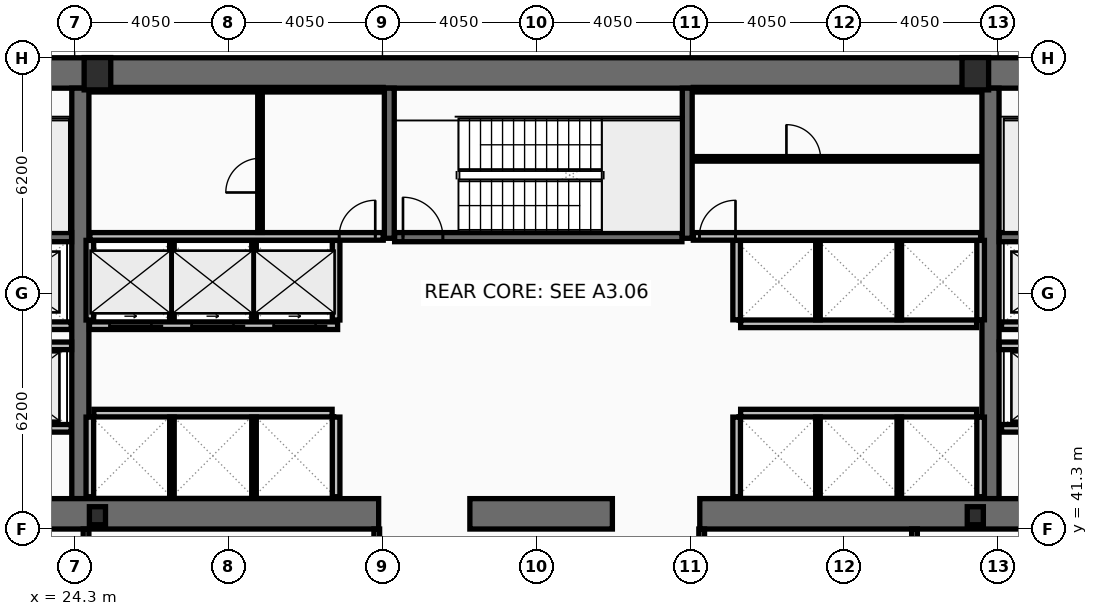
"""IFC4 building model, lengths in metres.
Left out: names, types, materials, properties, quantities, classifications, styles, units other than length and angle.
Written with IfcOpenShell. Run it as: python <this file> out.ifc"""

import sys

from ifc_helpers import new_model, si_unit, direction, frame, frame_2d, origin, origin_2d, place, context, subcontext, project, spatial, rectangle, hollow_rectangle, i_section, extrude, element, fill, save


model = new_model("IFC4")
c1 = context("Model", 3, precision=1e-05, world=origin(), true_north=direction((0.0, 1.0)))
c2 = subcontext(c1, "Body", "Model", "MODEL_VIEW")
j1 = project(units=[si_unit("LENGTHUNIT", "METRE"), si_unit("PLANEANGLEUNIT", "RADIAN")], contexts=[c1])
p1 = place(None, origin())
s1 = spatial("IfcSite", under=j1, at=p1, CompositionType="ELEMENT")
p2 = place(p1, origin())
s2 = spatial("IfcBuilding", under=s1, at=p2, CompositionType="ELEMENT")
p3 = place(p2, frame((0.0, 0.0, 85.8)))
s3 = spatial("IfcBuildingStorey", under=s2, at=p3, CompositionType="ELEMENT", Elevation=85.8)
p4 = place(p3, frame((16.2, 53.3, 0.0), z_axis=(0.0, 0.0, 1.0), x_axis=(1.0, 0.0, 0.0)))
e1 = element("IfcWall", 1, at=p4, inside=s3, PredefinedType="SHEAR", context=c2, shape_type="SweptSolid", body=[
    extrude(rectangle(XDim=40.5, YDim=0.8, at=frame_2d((20.25, 0.0))), origin(), (0.0, 0.0, 1.0), 4.62),
])
for number, where, z_axis, x_axis in (
    (2, (24.45, 42.1, 0.0), (0.0, 0.0, 1.0), (0.0, 1.0, 0.0)),
    (3, (48.4, 42.1, 0.0), (0.0, 0.0, 1.0), (0.0, 1.0, 0.0)),
):
    element("IfcWall", number, at=place(p3, frame(where, z_axis=z_axis, x_axis=x_axis)), inside=s3, PredefinedType="SHEAR", context=c2, shape_type="SweptSolid", body=[
        extrude(rectangle(XDim=10.8, YDim=0.45, at=frame_2d((5.4, 0.0))), origin(), (0.0, 0.0, 1.0), 4.62),
    ])
p5 = place(p3, frame((32.3, 41.7, 0.0), z_axis=(0.0, 0.0, 1.0), x_axis=(-1.0, 0.0, 0.0)))
e4 = element("IfcWall", 4, at=p5, inside=s3, PredefinedType="SHEAR", context=c2, shape_type="SweptSolid", body=[
    extrude(rectangle(XDim=11.45, YDim=0.8, at=frame_2d((5.725, 0.0))), origin(), (0.0, 0.0, 1.0), 4.62),
])
p6 = place(p3, frame((38.45, 41.7, 0.0), z_axis=(0.0, 0.0, 1.0), x_axis=(-1.0, 0.0, 0.0)))
e5 = element("IfcWall", 5, at=p6, inside=s3, PredefinedType="SHEAR", context=c2, shape_type="SweptSolid", body=[
    extrude(rectangle(XDim=3.75, YDim=0.8, at=frame_2d((1.875, 0.0))), origin(), (0.0, 0.0, 1.0), 4.62),
])
p7 = place(p3, frame((52.05, 41.7, 0.0), z_axis=(0.0, 0.0, 1.0), x_axis=(-1.0, 0.0, 0.0)))
e6 = element("IfcWall", 6, at=p7, inside=s3, PredefinedType="SHEAR", context=c2, shape_type="SweptSolid", body=[
    extrude(rectangle(XDim=11.3, YDim=0.8, at=frame_2d((5.65, 0.0))), origin(), (0.0, 0.0, 1.0), 4.62),
])
for number, where, z_axis, x_axis in (
    (7, (32.58, 48.95, 0.0), (0.0, 0.0, 1.0), (0.0, 1.0, 0.0)),
    (8, (40.42, 48.95, 0.0), (0.0, 0.0, 1.0), (0.0, 1.0, 0.0)),
):
    element("IfcWall", number, at=place(p3, frame(where, z_axis=z_axis, x_axis=x_axis)), inside=s3, PredefinedType="SHEAR", context=c2, shape_type="SweptSolid", body=[
        extrude(rectangle(XDim=3.95, YDim=0.26, at=frame_2d((1.975, 0.0))), origin(), (0.0, 0.0, 1.0), 4.62),
    ])
p8 = place(p3, frame((17.0, 48.98, 0.0), z_axis=(0.0, 0.0, 1.0), x_axis=(1.0, 0.0, 0.0)))
e9 = element("IfcWall", 9, at=p8, inside=s3, PredefinedType="SHEAR", context=c2, shape_type="SweptSolid", body=[
    extrude(rectangle(XDim=7.22, YDim=0.24, at=frame_2d((3.61, 0.0))), origin(), (0.0, 0.0, 1.0), 4.62),
])
p9 = place(p8, frame((0.22, 0.0, 0.0)))
e10 = element("IfcOpeningElement", 10, at=p9, cuts=e9, PredefinedType="OPENING", context=c2, shape_type="SweptSolid", body=[
    extrude(rectangle(XDim=1.05, YDim=2.15, at=frame_2d((0.525, 1.075))), frame((0.0, 0.13, 0.0), z_axis=(0.0, -1.0, 0.0), x_axis=(1.0, 0.0, 0.0)), (0.0, 0.0, 1.0), 0.26),
])
p10 = place(p3, frame((48.63, 48.98, 0.0), z_axis=(0.0, 0.0, 1.0), x_axis=(1.0, 0.0, 0.0)))
e11 = element("IfcWall", 11, at=p10, inside=s3, PredefinedType="SHEAR", context=c2, shape_type="SweptSolid", body=[
    extrude(rectangle(XDim=7.27, YDim=0.24, at=frame_2d((3.635, 0.0))), origin(), (0.0, 0.0, 1.0), 4.62),
])
p11 = place(p10, frame((6.0, 0.0, 0.0)))
e12 = element("IfcOpeningElement", 12, at=p11, cuts=e11, PredefinedType="OPENING", context=c2, shape_type="SweptSolid", body=[
    extrude(rectangle(XDim=1.05, YDim=2.15, at=frame_2d((0.525, 1.075))), frame((0.0, 0.13, 0.0), z_axis=(0.0, -1.0, 0.0), x_axis=(1.0, 0.0, 0.0)), (0.0, 0.0, 1.0), 0.26),
])
p12 = place(p3, frame((32.72, 48.98, 0.0), z_axis=(0.0, 0.0, 1.0), x_axis=(1.0, 0.0, 0.0)))
e13 = element("IfcWall", 13, at=p12, inside=s3, PredefinedType="SHEAR", context=c2, shape_type="SweptSolid", body=[
    extrude(rectangle(XDim=7.56, YDim=0.24, at=frame_2d((3.78, 0.0))), origin(), (0.0, 0.0, 1.0), 4.62),
])
p13 = place(p12, frame((0.22, 0.0, 0.0)))
e14 = element("IfcOpeningElement", 14, at=p13, cuts=e13, PredefinedType="OPENING", context=c2, shape_type="SweptSolid", body=[
    extrude(rectangle(XDim=1.05, YDim=2.15, at=frame_2d((0.525, 1.075))), frame((0.0, 0.13, 0.0), z_axis=(0.0, -1.0, 0.0), x_axis=(1.0, 0.0, 0.0)), (0.0, 0.0, 1.0), 0.26),
])
for number, where, z_axis, x_axis in (
    (15, (24.9, 53.28, 0.0), (0.0, 0.0, 1.0), (1.0, 0.0, 0.0)),
    (16, (48.0, 53.28, 0.0), (0.0, 0.0, 1.0), (1.0, 0.0, 0.0)),
):
    element("IfcColumn", number, at=place(p3, frame(where, z_axis=z_axis, x_axis=x_axis)), inside=s3, PredefinedType="COLUMN", context=c2, shape_type="SweptSolid", body=[
        extrude(hollow_rectangle(XDim=0.7, YDim=0.85, WallThickness=0.05, at=origin_2d()), origin(), (0.0, 0.0, 1.0), 4.8),
    ])
for number, where, z_axis, x_axis in (
    (17, (24.9, 41.65, 0.0), (0.0, 0.0, 1.0), (1.0, 0.0, 0.0)),
    (18, (48.0, 41.65, 0.0), (0.0, 0.0, 1.0), (1.0, 0.0, 0.0)),
):
    element("IfcColumn", number, at=place(p3, frame(where, z_axis=z_axis, x_axis=x_axis)), inside=s3, PredefinedType="COLUMN", context=c2, shape_type="SweptSolid", body=[
        extrude(i_section(OverallWidth=0.424, OverallDepth=0.474, WebThickness=0.048, FlangeThickness=0.077, at=origin_2d()), origin(), (0.0, 0.0, 1.0), 4.8),
    ])
p14 = place(p3, frame((51.61, 43.95, 0.0), z_axis=(0.0, 0.0, 1.0), x_axis=(-1.0, 0.0, 0.0)))
e19 = element("IfcWall", 19, at=p14, inside=s3, PredefinedType="PARTITIONING", context=c2, shape_type="SweptSolid", body=[
    extrude(rectangle(XDim=2.92, YDim=0.2, at=frame_2d((1.46, 0.0))), origin(), (0.0, 0.0, 1.0), 4.62),
])
p15 = place(p14, frame((0.81, 0.0, 0.0)))
e20 = element("IfcOpeningElement", 20, at=p15, cuts=e19, PredefinedType="OPENING", context=c2, shape_type="SweptSolid", body=[
    extrude(rectangle(XDim=1.3, YDim=2.18, at=frame_2d((0.65, 1.09))), frame((0.0, 0.11, 0.0), z_axis=(0.0, -1.0, 0.0), x_axis=(1.0, 0.0, 0.0)), (0.0, 0.0, 1.0), 0.22),
])
p16 = place(p3, frame((24.21, 43.95, 0.0), z_axis=(0.0, 0.0, 1.0), x_axis=(-1.0, 0.0, 0.0)))
e21 = element("IfcWall", 21, at=p16, inside=s3, PredefinedType="PARTITIONING", context=c2, shape_type="SweptSolid", body=[
    extrude(rectangle(XDim=2.97, YDim=0.2, at=frame_2d((1.485, 0.0))), origin(), (0.0, 0.0, 1.0), 4.62),
])
p17 = place(p16, frame((0.86, 0.0, 0.0)))
e22 = element("IfcOpeningElement", 22, at=p17, cuts=e21, PredefinedType="OPENING", context=c2, shape_type="SweptSolid", body=[
    extrude(rectangle(XDim=1.3, YDim=2.18, at=frame_2d((0.65, 1.09))), frame((0.0, 0.11, 0.0), z_axis=(0.0, -1.0, 0.0), x_axis=(1.0, 0.0, 0.0)), (0.0, 0.0, 1.0), 0.22),
])
p18 = place(p3, frame((51.61, 46.65, 0.0), z_axis=(0.0, 0.0, 1.0), x_axis=(-1.0, 0.0, 0.0)))
e23 = element("IfcWall", 23, at=p18, inside=s3, PredefinedType="PARTITIONING", context=c2, shape_type="SweptSolid", body=[
    extrude(rectangle(XDim=2.92, YDim=0.2, at=frame_2d((1.46, 0.0))), origin(), (0.0, 0.0, 1.0), 4.62),
])
p19 = place(p18, frame((0.86, 0.0, 0.0)))
e24 = element("IfcOpeningElement", 24, at=p19, cuts=e23, PredefinedType="OPENING", context=c2, shape_type="SweptSolid", body=[
    extrude(rectangle(XDim=1.2, YDim=2.18, at=frame_2d((0.6, 1.09))), frame((0.0, 0.11, 0.0), z_axis=(0.0, -1.0, 0.0), x_axis=(1.0, 0.0, 0.0)), (0.0, 0.0, 1.0), 0.22),
])
p20 = place(p3, frame((24.21, 46.65, 0.0), z_axis=(0.0, 0.0, 1.0), x_axis=(-1.0, 0.0, 0.0)))
e25 = element("IfcWall", 25, at=p20, inside=s3, PredefinedType="PARTITIONING", context=c2, shape_type="SweptSolid", body=[
    extrude(rectangle(XDim=2.97, YDim=0.2, at=frame_2d((1.485, 0.0))), origin(), (0.0, 0.0, 1.0), 4.62),
])
p21 = place(p20, frame((0.91, 0.0, 0.0)))
e26 = element("IfcOpeningElement", 26, at=p21, cuts=e25, PredefinedType="OPENING", context=c2, shape_type="SweptSolid", body=[
    extrude(rectangle(XDim=1.2, YDim=2.18, at=frame_2d((0.6, 1.09))), frame((0.0, 0.11, 0.0), z_axis=(0.0, -1.0, 0.0), x_axis=(1.0, 0.0, 0.0)), (0.0, 0.0, 1.0), 0.22),
])
p22 = place(p3, frame((31.22, 46.65, 0.0), z_axis=(0.0, 0.0, 1.0), x_axis=(-1.0, 0.0, 0.0)))
e27 = element("IfcWall", 27, at=p22, inside=s3, PredefinedType="PARTITIONING", context=c2, shape_type="SweptSolid", body=[
    extrude(rectangle(XDim=6.53, YDim=0.2, at=frame_2d((3.265, 0.0))), origin(), (0.0, 0.0, 1.0), 4.62),
])
p23 = place(p22, frame((4.9, 0.0, 0.0)))
e28 = element("IfcOpeningElement", 28, at=p23, cuts=e27, PredefinedType="OPENING", context=c2, shape_type="SweptSolid", body=[
    extrude(rectangle(XDim=1.1, YDim=2.18, at=frame_2d((0.55, 1.09))), frame((0.0, 0.11, 0.0), z_axis=(0.0, -1.0, 0.0), x_axis=(1.0, 0.0, 0.0)), (0.0, 0.0, 1.0), 0.22),
])
p24 = place(p22, frame((2.74, 0.0, 0.0)))
e29 = element("IfcOpeningElement", 29, at=p24, cuts=e27, PredefinedType="OPENING", context=c2, shape_type="SweptSolid", body=[
    extrude(rectangle(XDim=1.1, YDim=2.18, at=frame_2d((0.55, 1.09))), frame((0.0, 0.11, 0.0), z_axis=(0.0, -1.0, 0.0), x_axis=(1.0, 0.0, 0.0)), (0.0, 0.0, 1.0), 0.22),
])
p25 = place(p22, frame((0.58, 0.0, 0.0)))
e30 = element("IfcOpeningElement", 30, at=p25, cuts=e27, PredefinedType="OPENING", context=c2, shape_type="SweptSolid", body=[
    extrude(rectangle(XDim=1.1, YDim=2.18, at=frame_2d((0.55, 1.09))), frame((0.0, 0.11, 0.0), z_axis=(0.0, -1.0, 0.0), x_axis=(1.0, 0.0, 0.0)), (0.0, 0.0, 1.0), 0.22),
])
p26 = place(p3, frame((21.2, 46.12, 0.0), z_axis=(0.0, 0.0, 1.0), x_axis=(1.0, 0.0, 0.0)))
e31 = element("IfcWall", 31, at=p26, inside=s3, PredefinedType="PARTITIONING", context=c2, shape_type="SweptSolid", body=[
    extrude(rectangle(XDim=3.02, YDim=0.2, at=frame_2d((1.51, 0.0))), origin(), (0.0, 0.0, 1.0), 4.62),
])
p27 = place(p3, frame((48.63, 46.12, 0.0), z_axis=(0.0, 0.0, 1.0), x_axis=(1.0, 0.0, 0.0)))
e32 = element("IfcWall", 32, at=p27, inside=s3, PredefinedType="PARTITIONING", context=c2, shape_type="SweptSolid", body=[
    extrude(rectangle(XDim=3.07, YDim=0.2, at=frame_2d((1.535, 0.0))), origin(), (0.0, 0.0, 1.0), 4.62),
])
for number, where, z_axis, x_axis in (
    (33, (24.7, 46.8, 0.0), (0.0, 0.0, 1.0), (0.0, 1.0, 0.0)),
    (34, (31.18, 46.8, 0.0), (0.0, 0.0, 1.0), (0.0, 1.0, 0.0)),
):
    element("IfcWall", number, at=place(p3, frame(where, z_axis=z_axis, x_axis=x_axis)), inside=s3, PredefinedType="PARTITIONING", context=c2, shape_type="SweptSolid", body=[
        extrude(rectangle(XDim=2.095, YDim=0.2, at=frame_2d((1.047, 0.0))), origin(), (0.0, 0.0, 1.0), 4.62),
    ])
for number, where, z_axis, x_axis in (
    (35, (26.86, 46.8, 0.0), (0.0, 0.0, 1.0), (0.0, 1.0, 0.0)),
    (36, (29.02, 46.8, 0.0), (0.0, 0.0, 1.0), (0.0, 1.0, 0.0)),
):
    element("IfcWall", number, at=place(p3, frame(where, z_axis=z_axis, x_axis=x_axis)), inside=s3, PredefinedType="PARTITIONING", context=c2, shape_type="SweptSolid", body=[
        extrude(rectangle(XDim=2.095, YDim=0.12, at=frame_2d((1.047, 0.0))), origin(), (0.0, 0.0, 1.0), 4.62),
    ])
p28 = place(p3, frame((24.805, 44.35, 0.0), z_axis=(0.0, 0.0, 1.0), x_axis=(1.0, 0.0, 0.0)))
e37 = element("IfcWall", 37, at=p28, inside=s3, PredefinedType="PARTITIONING", context=c2, shape_type="SweptSolid", body=[
    extrude(rectangle(XDim=6.27, YDim=0.2, at=frame_2d((3.135, 0.0))), origin(), (0.0, 0.0, 1.0), 4.62),
])
for number, where, z_axis, x_axis in (
    (38, (24.7, 42.15, 0.0), (0.0, 0.0, 1.0), (0.0, 1.0, 0.0)),
    (39, (31.18, 42.15, 0.0), (0.0, 0.0, 1.0), (0.0, 1.0, 0.0)),
):
    element("IfcWall", number, at=place(p3, frame(where, z_axis=z_axis, x_axis=x_axis)), inside=s3, PredefinedType="PARTITIONING", context=c2, shape_type="SweptSolid", body=[
        extrude(rectangle(XDim=2.095, YDim=0.2, at=frame_2d((1.048, 0.0))), origin(), (0.0, 0.0, 1.0), 4.62),
    ])
for number, where, z_axis, x_axis in (
    (40, (26.86, 42.15, 0.0), (0.0, 0.0, 1.0), (0.0, 1.0, 0.0)),
    (41, (29.02, 42.15, 0.0), (0.0, 0.0, 1.0), (0.0, 1.0, 0.0)),
):
    element("IfcWall", number, at=place(p3, frame(where, z_axis=z_axis, x_axis=x_axis)), inside=s3, PredefinedType="PARTITIONING", context=c2, shape_type="SweptSolid", body=[
        extrude(rectangle(XDim=2.095, YDim=0.12, at=frame_2d((1.048, 0.0))), origin(), (0.0, 0.0, 1.0), 4.62),
    ])
p29 = place(p3, frame((41.825, 46.7, 0.0), z_axis=(0.0, 0.0, 1.0), x_axis=(1.0, 0.0, 0.0)))
e42 = element("IfcWall", 42, at=p29, inside=s3, PredefinedType="PARTITIONING", context=c2, shape_type="SweptSolid", body=[
    extrude(rectangle(XDim=6.21, YDim=0.2, at=frame_2d((3.105, 0.0))), origin(), (0.0, 0.0, 1.0), 4.62),
])
for number, where, z_axis, x_axis in (
    (43, (41.72, 46.805, 0.0), (0.0, 0.0, 1.0), (0.0, 1.0, 0.0)),
    (44, (48.14, 46.805, 0.0), (0.0, 0.0, 1.0), (0.0, 1.0, 0.0)),
):
    element("IfcWall", number, at=place(p3, frame(where, z_axis=z_axis, x_axis=x_axis)), inside=s3, PredefinedType="PARTITIONING", context=c2, shape_type="SweptSolid", body=[
        extrude(rectangle(XDim=2.09, YDim=0.2, at=frame_2d((1.045, 0.0))), origin(), (0.0, 0.0, 1.0), 4.62),
    ])
for number, where, z_axis, x_axis in (
    (45, (43.86, 46.805, 0.0), (0.0, 0.0, 1.0), (0.0, 1.0, 0.0)),
    (46, (46.0, 46.805, 0.0), (0.0, 0.0, 1.0), (0.0, 1.0, 0.0)),
):
    element("IfcWall", number, at=place(p3, frame(where, z_axis=z_axis, x_axis=x_axis)), inside=s3, PredefinedType="PARTITIONING", context=c2, shape_type="SweptSolid", body=[
        extrude(rectangle(XDim=2.09, YDim=0.12, at=frame_2d((1.045, 0.0))), origin(), (0.0, 0.0, 1.0), 4.62),
    ])
p30 = place(p3, frame((41.825, 44.35, 0.0), z_axis=(0.0, 0.0, 1.0), x_axis=(1.0, 0.0, 0.0)))
e47 = element("IfcWall", 47, at=p30, inside=s3, PredefinedType="PARTITIONING", context=c2, shape_type="SweptSolid", body=[
    extrude(rectangle(XDim=6.21, YDim=0.2, at=frame_2d((3.105, 0.0))), origin(), (0.0, 0.0, 1.0), 4.62),
])
for number, where, z_axis, x_axis in (
    (48, (41.72, 42.15, 0.0), (0.0, 0.0, 1.0), (0.0, 1.0, 0.0)),
    (49, (48.14, 42.15, 0.0), (0.0, 0.0, 1.0), (0.0, 1.0, 0.0)),
):
    element("IfcWall", number, at=place(p3, frame(where, z_axis=z_axis, x_axis=x_axis)), inside=s3, PredefinedType="PARTITIONING", context=c2, shape_type="SweptSolid", body=[
        extrude(rectangle(XDim=2.095, YDim=0.2, at=frame_2d((1.048, 0.0))), origin(), (0.0, 0.0, 1.0), 4.62),
    ])
for number, where, z_axis, x_axis in (
    (50, (43.86, 42.15, 0.0), (0.0, 0.0, 1.0), (0.0, 1.0, 0.0)),
    (51, (46.0, 42.15, 0.0), (0.0, 0.0, 1.0), (0.0, 1.0, 0.0)),
):
    element("IfcWall", number, at=place(p3, frame(where, z_axis=z_axis, x_axis=x_axis)), inside=s3, PredefinedType="PARTITIONING", context=c2, shape_type="SweptSolid", body=[
        extrude(rectangle(XDim=2.095, YDim=0.12, at=frame_2d((1.048, 0.0))), origin(), (0.0, 0.0, 1.0), 4.62),
    ])
p31 = place(p3, frame((24.7, 52.86, 0.0), z_axis=(0.0, 0.0, 1.0), x_axis=(1.0, 0.0, 0.0)))
e52 = element("IfcWall", 52, at=p31, inside=s3, PredefinedType="PARTITIONING", context=c2, shape_type="SweptSolid", body=[
    extrude(rectangle(XDim=7.72, YDim=0.12, at=frame_2d((3.86, 0.0))), origin(), (0.0, 0.0, 1.0), 4.62),
])
p32 = place(p3, frame((24.7, 49.0, 0.0), z_axis=(0.0, 0.0, 1.0), x_axis=(1.0, 0.0, 0.0)))
e53 = element("IfcWall", 53, at=p32, inside=s3, PredefinedType="PARTITIONING", context=c2, shape_type="SweptSolid", body=[
    extrude(rectangle(XDim=7.72, YDim=0.2, at=frame_2d((3.86, 0.0))), origin(), (0.0, 0.0, 1.0), 4.62),
])
p33 = place(p32, frame((6.56, 0.0, 0.0)))
e54 = element("IfcOpeningElement", 54, at=p33, cuts=e53, PredefinedType="OPENING", context=c2, shape_type="SweptSolid", body=[
    extrude(rectangle(XDim=0.95, YDim=2.1, at=frame_2d((0.475, 1.05))), frame((0.0, 0.11, 0.0), z_axis=(0.0, -1.0, 0.0), x_axis=(1.0, 0.0, 0.0)), (0.0, 0.0, 1.0), 0.22),
])
p34 = place(p3, frame((29.177, 49.105, 0.0), z_axis=(0.0, 0.0, 1.0), x_axis=(0.0, 1.0, 0.0)))
e55 = element("IfcWall", 55, at=p34, inside=s3, PredefinedType="PARTITIONING", context=c2, shape_type="SweptSolid", body=[
    extrude(rectangle(XDim=3.69, YDim=0.12, at=frame_2d((1.845, 0.0))), origin(), (0.0, 0.0, 1.0), 4.62),
])
p35 = place(p34, frame((1.05, 0.0, 0.0)))
e56 = element("IfcOpeningElement", 56, at=p35, cuts=e55, PredefinedType="OPENING", context=c2, shape_type="SweptSolid", body=[
    extrude(rectangle(XDim=0.9, YDim=2.05, at=frame_2d((0.45, 1.025))), frame((0.0, 0.07, 0.0), z_axis=(0.0, -1.0, 0.0), x_axis=(1.0, 0.0, 0.0)), (0.0, 0.0, 1.0), 0.14),
])
p36 = place(p3, frame((40.58, 52.86, 0.0), z_axis=(0.0, 0.0, 1.0), x_axis=(1.0, 0.0, 0.0)))
e57 = element("IfcWall", 57, at=p36, inside=s3, PredefinedType="PARTITIONING", context=c2, shape_type="SweptSolid", body=[
    extrude(rectangle(XDim=7.56, YDim=0.12, at=frame_2d((3.78, 0.0))), origin(), (0.0, 0.0, 1.0), 4.62),
])
p37 = place(p3, frame((40.58, 49.0, 0.0), z_axis=(0.0, 0.0, 1.0), x_axis=(1.0, 0.0, 0.0)))
e58 = element("IfcWall", 58, at=p37, inside=s3, PredefinedType="PARTITIONING", context=c2, shape_type="SweptSolid", body=[
    extrude(rectangle(XDim=7.56, YDim=0.2, at=frame_2d((3.78, 0.0))), origin(), (0.0, 0.0, 1.0), 4.62),
])
p38 = place(p37, frame((0.16, 0.0, 0.0)))
e59 = element("IfcOpeningElement", 59, at=p38, cuts=e58, PredefinedType="OPENING", context=c2, shape_type="SweptSolid", body=[
    extrude(rectangle(XDim=0.95, YDim=2.1, at=frame_2d((0.475, 1.05))), frame((0.0, 0.11, 0.0), z_axis=(0.0, -1.0, 0.0), x_axis=(1.0, 0.0, 0.0)), (0.0, 0.0, 1.0), 0.22),
])
p39 = place(p3, frame((40.63, 51.04, 0.0), z_axis=(0.0, 0.0, 1.0), x_axis=(1.0, 0.0, 0.0)))
e60 = element("IfcWall", 60, at=p39, inside=s3, PredefinedType="PARTITIONING", context=c2, shape_type="SweptSolid", body=[
    extrude(rectangle(XDim=7.46, YDim=0.12, at=frame_2d((3.73, 0.0))), origin(), (0.0, 0.0, 1.0), 4.62),
])
p40 = place(p39, frame((2.4, 0.0, 0.0)))
e61 = element("IfcOpeningElement", 61, at=p40, cuts=e60, PredefinedType="OPENING", context=c2, shape_type="SweptSolid", body=[
    extrude(rectangle(XDim=0.9, YDim=2.05, at=frame_2d((0.45, 1.025))), frame((0.0, 0.07, 0.0), z_axis=(0.0, -1.0, 0.0), x_axis=(1.0, 0.0, 0.0)), (0.0, 0.0, 1.0), 0.14),
])
p41 = place(p3, frame((24.6, 38.28, 0.0), z_axis=(0.0, 0.0, 1.0), x_axis=(0.0, 1.0, 0.0)))
e62 = element("IfcWall", 62, at=p41, inside=s3, PredefinedType="PARTITIONING", context=c2, shape_type="SweptSolid", body=[
    extrude(rectangle(XDim=3.02, YDim=0.15, at=frame_2d((1.51, 0.0))), origin(), (0.0, 0.0, 1.0), 3.81),
])
for number, where, z_axis, x_axis in (
    (63, (32.25, 38.28, 0.0), (0.0, 0.0, 1.0), (0.0, 1.0, 0.0)),
    (64, (40.8, 38.28, 0.0), (0.0, 0.0, 1.0), (0.0, 1.0, 0.0)),
    (65, (46.4, 38.28, 0.0), (0.0, 0.0, 1.0), (0.0, 1.0, 0.0)),
):
    element("IfcWall", number, at=place(p3, frame(where, z_axis=z_axis, x_axis=x_axis)), inside=s3, PredefinedType="PARTITIONING", context=c2, shape_type="SweptSolid", body=[
        extrude(rectangle(XDim=3.02, YDim=0.15, at=frame_2d((1.51, 0.0))), origin(), (0.0, 0.0, 1.0), 4.62),
    ])
p42 = place(p13, origin())
e66 = element("IfcDoor", 66, at=p42, inside=s3, OperationType="SINGLE_SWING_LEFT", PredefinedType="DOOR", context=c2, shape_type="SweptSolid", body=[
    extrude(rectangle(XDim=1.05, YDim=2.15, at=frame_2d((0.525, 1.075))), frame((0.0, 0.025, 0.0), z_axis=(0.0, -1.0, 0.0), x_axis=(1.0, 0.0, 0.0)), (0.0, 0.0, 1.0), 0.05),
])
fill(e14, e66)
p43 = place(p23, origin())
e67 = element("IfcDoor", 67, at=p43, inside=s3, OperationType="SLIDING_TO_LEFT", PredefinedType="DOOR", context=c2, shape_type="SweptSolid", body=[
    extrude(rectangle(XDim=1.1, YDim=2.18, at=frame_2d((0.55, 1.09))), frame((0.0, 0.025, 0.0), z_axis=(0.0, -1.0, 0.0), x_axis=(1.0, 0.0, 0.0)), (0.0, 0.0, 1.0), 0.05),
])
fill(e28, e67)
p44 = place(p24, origin())
e68 = element("IfcDoor", 68, at=p44, inside=s3, OperationType="SLIDING_TO_LEFT", PredefinedType="DOOR", context=c2, shape_type="SweptSolid", body=[
    extrude(rectangle(XDim=1.1, YDim=2.18, at=frame_2d((0.55, 1.09))), frame((0.0, 0.025, 0.0), z_axis=(0.0, -1.0, 0.0), x_axis=(1.0, 0.0, 0.0)), (0.0, 0.0, 1.0), 0.05),
])
fill(e29, e68)
p45 = place(p25, origin())
e69 = element("IfcDoor", 69, at=p45, inside=s3, OperationType="SLIDING_TO_LEFT", PredefinedType="DOOR", context=c2, shape_type="SweptSolid", body=[
    extrude(rectangle(XDim=1.1, YDim=2.18, at=frame_2d((0.55, 1.09))), frame((0.0, 0.025, 0.0), z_axis=(0.0, -1.0, 0.0), x_axis=(1.0, 0.0, 0.0)), (0.0, 0.0, 1.0), 0.05),
])
fill(e30, e69)
p46 = place(p33, origin())
e70 = element("IfcDoor", 70, at=p46, inside=s3, OperationType="SINGLE_SWING_RIGHT", PredefinedType="DOOR", context=c2, shape_type="SweptSolid", body=[
    extrude(rectangle(XDim=0.95, YDim=2.1, at=frame_2d((0.475, 1.05))), frame((0.0, 0.025, 0.0), z_axis=(0.0, -1.0, 0.0), x_axis=(1.0, 0.0, 0.0)), (0.0, 0.0, 1.0), 0.05),
])
fill(e54, e70)
p47 = place(p35, origin())
e71 = element("IfcDoor", 71, at=p47, inside=s3, OperationType="SINGLE_SWING_LEFT", PredefinedType="DOOR", context=c2, shape_type="SweptSolid", body=[
    extrude(rectangle(XDim=0.9, YDim=2.05, at=frame_2d((0.45, 1.025))), frame((0.0, 0.025, 0.0), z_axis=(0.0, -1.0, 0.0), x_axis=(1.0, 0.0, 0.0)), (0.0, 0.0, 1.0), 0.05),
])
fill(e56, e71)
p48 = place(p38, origin())
e72 = element("IfcDoor", 72, at=p48, inside=s3, OperationType="SINGLE_SWING_RIGHT", PredefinedType="DOOR", context=c2, shape_type="SweptSolid", body=[
    extrude(rectangle(XDim=0.95, YDim=2.1, at=frame_2d((0.475, 1.05))), frame((0.0, 0.025, 0.0), z_axis=(0.0, -1.0, 0.0), x_axis=(1.0, 0.0, 0.0)), (0.0, 0.0, 1.0), 0.05),
])
fill(e59, e72)
p49 = place(p40, origin())
e73 = element("IfcDoor", 73, at=p49, inside=s3, OperationType="SINGLE_SWING_LEFT", PredefinedType="DOOR", context=c2, shape_type="SweptSolid", body=[
    extrude(rectangle(XDim=0.9, YDim=2.05, at=frame_2d((0.45, 1.025))), frame((0.0, 0.025, 0.0), z_axis=(0.0, -1.0, 0.0), x_axis=(1.0, 0.0, 0.0)), (0.0, 0.0, 1.0), 0.05),
])
fill(e61, e73)
save(model, sys.argv[1])
